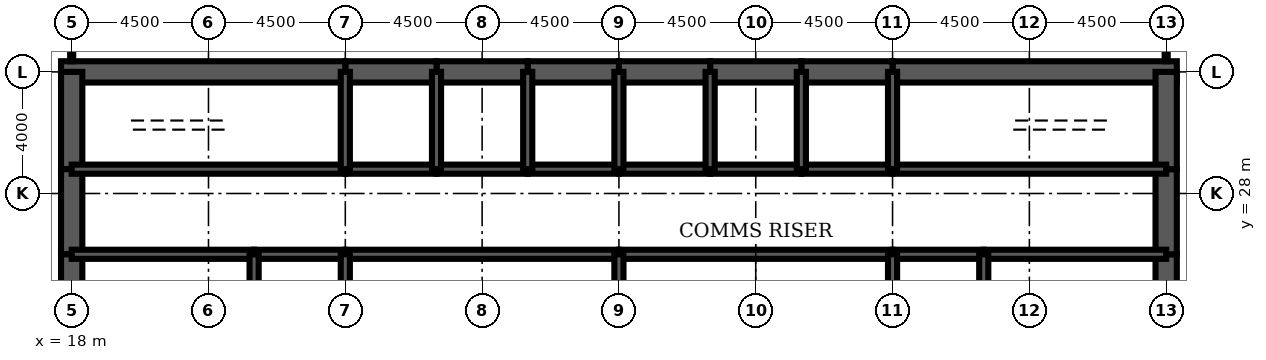
"""IFC4 building model, lengths in metres.
Left out: names, types, materials, properties, quantities, classifications, styles, units other than length and angle.
Written with IfcOpenShell. Run it as: python <this file> out.ifc"""

import sys

from ifc_helpers import new_model, si_unit, direction, frame, frame_2d, origin, place, context, subcontext, project, spatial, rectangle, extrude, element, fill, save


model = new_model("IFC4")
c1 = context("Model", 3, precision=1e-05, world=origin(), true_north=direction((0.0, 1.0)))
c2 = subcontext(c1, "Body", "Model", "MODEL_VIEW")
j1 = project(units=[si_unit("LENGTHUNIT", "METRE"), si_unit("PLANEANGLEUNIT", "RADIAN")], contexts=[c1])
p1 = place(None, origin())
s1 = spatial("IfcSite", under=j1, at=p1, CompositionType="ELEMENT")
p2 = place(p1, origin())
s2 = spatial("IfcBuilding", under=s1, at=p2, CompositionType="ELEMENT")
p3 = place(p2, frame((0.0, 0.0, 275.3)))
s3 = spatial("IfcBuildingStorey", under=s2, at=p3, CompositionType="ELEMENT", Elevation=275.3)
p4 = place(p3, frame((54.35, 32.0, 0.0), z_axis=(0.0, 0.0, 1.0), x_axis=(-1.0, 0.0, 0.0)))
e1 = element("IfcWall", 1, at=p4, inside=s3, PredefinedType="SHEAR", context=c2, shape_type="SweptSolid", body=[
    extrude(rectangle(XDim=9.35, YDim=0.7, at=frame_2d((4.675, 0.0))), origin(), (0.0, 0.0, 1.0), 4.2),
])
for number, where, z_axis, x_axis in (
    (2, (45.0, 32.0, 0.0), (0.0, 0.0, 1.0), (-1.0, 0.0, 0.0)),
    (3, (42.0, 32.0, 0.0), (0.0, 0.0, 1.0), (-1.0, 0.0, 0.0)),
    (4, (39.0, 32.0, 0.0), (0.0, 0.0, 1.0), (-1.0, 0.0, 0.0)),
    (5, (36.0, 32.0, 0.0), (0.0, 0.0, 1.0), (-1.0, 0.0, 0.0)),
    (6, (33.0, 32.0, 0.0), (0.0, 0.0, 1.0), (-1.0, 0.0, 0.0)),
    (7, (30.0, 32.0, 0.0), (0.0, 0.0, 1.0), (-1.0, 0.0, 0.0)),
):
    element("IfcWall", number, at=place(p3, frame(where, z_axis=z_axis, x_axis=x_axis)), inside=s3, PredefinedType="SHEAR", context=c2, shape_type="SweptSolid", body=[
        extrude(rectangle(XDim=3.0, YDim=0.7, at=frame_2d((1.5, 0.0))), origin(), (0.0, 0.0, 1.0), 4.2),
    ])
p5 = place(p3, frame((27.0, 32.0, 0.0), z_axis=(0.0, 0.0, 1.0), x_axis=(-1.0, 0.0, 0.0)))
e8 = element("IfcWall", 8, at=p5, inside=s3, PredefinedType="SHEAR", context=c2, shape_type="SweptSolid", body=[
    extrude(rectangle(XDim=9.35, YDim=0.7, at=frame_2d((4.675, 0.0))), origin(), (0.0, 0.0, 1.0), 4.2),
])
p6 = place(p3, frame((18.0, 32.0, 0.0), z_axis=(0.0, 0.0, 1.0), x_axis=(0.0, -1.0, 0.0)))
e9 = element("IfcWall", 9, at=p6, inside=s3, PredefinedType="SHEAR", context=c2, shape_type="SweptSolid", body=[
    extrude(rectangle(XDim=3.2, YDim=0.7, at=frame_2d((1.6, 0.0))), origin(), (0.0, 0.0, 1.0), 4.2),
])
p7 = place(p3, frame((18.0, 28.8, 0.0), z_axis=(0.0, 0.0, 1.0), x_axis=(0.0, -1.0, 0.0)))
e10 = element("IfcWall", 10, at=p7, inside=s3, PredefinedType="SHEAR", context=c2, shape_type="SweptSolid", body=[
    extrude(rectangle(XDim=2.8, YDim=0.7, at=frame_2d((1.4, 0.0))), origin(), (0.0, 0.0, 1.0), 4.2),
])
p8 = place(p7, frame((0.4, 0.0, 0.0)))
e11 = element("IfcOpeningElement", 11, at=p8, cuts=e10, PredefinedType="OPENING", context=c2, shape_type="SweptSolid", body=[
    extrude(rectangle(XDim=1.8, YDim=2.1, at=frame_2d((0.9, 1.05))), frame((0.0, 0.36, 0.0), z_axis=(0.0, -1.0, 0.0), x_axis=(1.0, 0.0, 0.0)), (0.0, 0.0, 1.0), 0.72),
])
for number, where, z_axis, x_axis in (
    (12, (18.0, 26.0, 0.0), (0.0, 0.0, 1.0), (0.0, -1.0, 0.0)),
    (13, (54.0, 22.0, 0.0), (0.0, 0.0, 1.0), (0.0, 1.0, 0.0)),
):
    element("IfcWall", number, at=place(p3, frame(where, z_axis=z_axis, x_axis=x_axis)), inside=s3, PredefinedType="SHEAR", context=c2, shape_type="SweptSolid", body=[
        extrude(rectangle(XDim=4.0, YDim=0.7, at=frame_2d((2.0, 0.0))), origin(), (0.0, 0.0, 1.0), 4.2),
    ])
p9 = place(p3, frame((54.0, 26.0, 0.0), z_axis=(0.0, 0.0, 1.0), x_axis=(0.0, 1.0, 0.0)))
e14 = element("IfcWall", 14, at=p9, inside=s3, PredefinedType="SHEAR", context=c2, shape_type="SweptSolid", body=[
    extrude(rectangle(XDim=2.8, YDim=0.7, at=frame_2d((1.4, 0.0))), origin(), (0.0, 0.0, 1.0), 4.2),
])
p10 = place(p9, frame((0.6, 0.0, 0.0)))
e15 = element("IfcOpeningElement", 15, at=p10, cuts=e14, PredefinedType="OPENING", context=c2, shape_type="SweptSolid", body=[
    extrude(rectangle(XDim=1.8, YDim=2.1, at=frame_2d((0.9, 1.05))), frame((0.0, 0.36, 0.0), z_axis=(0.0, -1.0, 0.0), x_axis=(1.0, 0.0, 0.0)), (0.0, 0.0, 1.0), 0.72),
])
p11 = place(p3, frame((54.0, 28.8, 0.0), z_axis=(0.0, 0.0, 1.0), x_axis=(0.0, 1.0, 0.0)))
e16 = element("IfcWall", 16, at=p11, inside=s3, PredefinedType="SHEAR", context=c2, shape_type="SweptSolid", body=[
    extrude(rectangle(XDim=3.2, YDim=0.7, at=frame_2d((1.6, 0.0))), origin(), (0.0, 0.0, 1.0), 4.2),
])
p12 = place(p3, frame((18.0, 28.8, 0.0), z_axis=(0.0, 0.0, 1.0), x_axis=(1.0, 0.0, 0.0)))
e17 = element("IfcWall", 17, at=p12, inside=s3, PredefinedType="SOLIDWALL", context=c2, shape_type="SweptSolid", body=[
    extrude(rectangle(XDim=9.0, YDim=0.3, at=frame_2d((4.5, 0.0))), origin(), (0.0, 0.0, 1.0), 4.2),
])
p13 = place(p12, frame((0.65, 0.0, 0.0)))
e18 = element("IfcOpeningElement", 18, at=p13, cuts=e17, PredefinedType="OPENING", context=c2, shape_type="SweptSolid", body=[
    extrude(rectangle(XDim=1.0, YDim=2.1, at=frame_2d((0.5, 1.05))), frame((0.0, 0.16, 0.0), z_axis=(0.0, -1.0, 0.0), x_axis=(1.0, 0.0, 0.0)), (0.0, 0.0, 1.0), 0.32),
])
p14 = place(p3, frame((27.0, 28.8, 0.0), z_axis=(0.0, 0.0, 1.0), x_axis=(1.0, 0.0, 0.0)))
e19 = element("IfcWall", 19, at=p14, inside=s3, PredefinedType="SOLIDWALL", context=c2, shape_type="SweptSolid", body=[
    extrude(rectangle(XDim=3.0, YDim=0.3, at=frame_2d((1.5, 0.0))), origin(), (0.0, 0.0, 1.0), 4.2),
])
p15 = place(p14, frame((0.95, 0.0, 0.0)))
e20 = element("IfcOpeningElement", 20, at=p15, cuts=e19, PredefinedType="OPENING", context=c2, shape_type="SweptSolid", body=[
    extrude(rectangle(XDim=1.1, YDim=2.2, at=frame_2d((0.55, 1.1))), frame((0.0, 0.16, 0.0), z_axis=(0.0, -1.0, 0.0), x_axis=(1.0, 0.0, 0.0)), (0.0, 0.0, 1.0), 0.32),
])
p16 = place(p3, frame((30.0, 28.8, 0.0), z_axis=(0.0, 0.0, 1.0), x_axis=(1.0, 0.0, 0.0)))
e21 = element("IfcWall", 21, at=p16, inside=s3, PredefinedType="SOLIDWALL", context=c2, shape_type="SweptSolid", body=[
    extrude(rectangle(XDim=3.0, YDim=0.3, at=frame_2d((1.5, 0.0))), origin(), (0.0, 0.0, 1.0), 4.2),
])
p17 = place(p16, frame((0.95, 0.0, 0.0)))
e22 = element("IfcOpeningElement", 22, at=p17, cuts=e21, PredefinedType="OPENING", context=c2, shape_type="SweptSolid", body=[
    extrude(rectangle(XDim=1.1, YDim=2.2, at=frame_2d((0.55, 1.1))), frame((0.0, 0.16, 0.0), z_axis=(0.0, -1.0, 0.0), x_axis=(1.0, 0.0, 0.0)), (0.0, 0.0, 1.0), 0.32),
])
p18 = place(p3, frame((33.0, 28.8, 0.0), z_axis=(0.0, 0.0, 1.0), x_axis=(1.0, 0.0, 0.0)))
e23 = element("IfcWall", 23, at=p18, inside=s3, PredefinedType="SOLIDWALL", context=c2, shape_type="SweptSolid", body=[
    extrude(rectangle(XDim=3.0, YDim=0.3, at=frame_2d((1.5, 0.0))), origin(), (0.0, 0.0, 1.0), 4.2),
])
p19 = place(p18, frame((0.95, 0.0, 0.0)))
e24 = element("IfcOpeningElement", 24, at=p19, cuts=e23, PredefinedType="OPENING", context=c2, shape_type="SweptSolid", body=[
    extrude(rectangle(XDim=1.1, YDim=2.2, at=frame_2d((0.55, 1.1))), frame((0.0, 0.16, 0.0), z_axis=(0.0, -1.0, 0.0), x_axis=(1.0, 0.0, 0.0)), (0.0, 0.0, 1.0), 0.32),
])
p20 = place(p3, frame((36.0, 28.8, 0.0), z_axis=(0.0, 0.0, 1.0), x_axis=(1.0, 0.0, 0.0)))
e25 = element("IfcWall", 25, at=p20, inside=s3, PredefinedType="SOLIDWALL", context=c2, shape_type="SweptSolid", body=[
    extrude(rectangle(XDim=3.0, YDim=0.3, at=frame_2d((1.5, 0.0))), origin(), (0.0, 0.0, 1.0), 4.2),
])
p21 = place(p20, frame((1.0, 0.0, 0.0)))
e26 = element("IfcOpeningElement", 26, at=p21, cuts=e25, PredefinedType="OPENING", context=c2, shape_type="SweptSolid", body=[
    extrude(rectangle(XDim=1.0, YDim=2.1, at=frame_2d((0.5, 1.05))), frame((0.0, 0.16, 0.0), z_axis=(0.0, -1.0, 0.0), x_axis=(1.0, 0.0, 0.0)), (0.0, 0.0, 1.0), 0.32),
])
p22 = place(p3, frame((39.0, 28.8, 0.0), z_axis=(0.0, 0.0, 1.0), x_axis=(1.0, 0.0, 0.0)))
e27 = element("IfcWall", 27, at=p22, inside=s3, PredefinedType="SOLIDWALL", context=c2, shape_type="SweptSolid", body=[
    extrude(rectangle(XDim=3.0, YDim=0.3, at=frame_2d((1.5, 0.0))), origin(), (0.0, 0.0, 1.0), 4.2),
])
p23 = place(p22, frame((1.0, 0.0, 0.0)))
e28 = element("IfcOpeningElement", 28, at=p23, cuts=e27, PredefinedType="OPENING", context=c2, shape_type="SweptSolid", body=[
    extrude(rectangle(XDim=1.0, YDim=2.1, at=frame_2d((0.5, 1.05))), frame((0.0, 0.16, 0.0), z_axis=(0.0, -1.0, 0.0), x_axis=(1.0, 0.0, 0.0)), (0.0, 0.0, 1.0), 0.32),
])
p24 = place(p3, frame((42.0, 28.8, 0.0), z_axis=(0.0, 0.0, 1.0), x_axis=(1.0, 0.0, 0.0)))
e29 = element("IfcWall", 29, at=p24, inside=s3, PredefinedType="SOLIDWALL", context=c2, shape_type="SweptSolid", body=[
    extrude(rectangle(XDim=3.0, YDim=0.3, at=frame_2d((1.5, 0.0))), origin(), (0.0, 0.0, 1.0), 4.2),
])
p25 = place(p24, frame((0.95, 0.0, 0.0)))
e30 = element("IfcOpeningElement", 30, at=p25, cuts=e29, PredefinedType="OPENING", context=c2, shape_type="SweptSolid", body=[
    extrude(rectangle(XDim=1.1, YDim=2.2, at=frame_2d((0.55, 1.1))), frame((0.0, 0.16, 0.0), z_axis=(0.0, -1.0, 0.0), x_axis=(1.0, 0.0, 0.0)), (0.0, 0.0, 1.0), 0.32),
])
p26 = place(p3, frame((45.0, 28.8, 0.0), z_axis=(0.0, 0.0, 1.0), x_axis=(1.0, 0.0, 0.0)))
e31 = element("IfcWall", 31, at=p26, inside=s3, PredefinedType="SOLIDWALL", context=c2, shape_type="SweptSolid", body=[
    extrude(rectangle(XDim=9.0, YDim=0.3, at=frame_2d((4.5, 0.0))), origin(), (0.0, 0.0, 1.0), 4.2),
])
p27 = place(p26, frame((7.35, 0.0, 0.0)))
e32 = element("IfcOpeningElement", 32, at=p27, cuts=e31, PredefinedType="OPENING", context=c2, shape_type="SweptSolid", body=[
    extrude(rectangle(XDim=1.0, YDim=2.1, at=frame_2d((0.5, 1.05))), frame((0.0, 0.16, 0.0), z_axis=(0.0, -1.0, 0.0), x_axis=(1.0, 0.0, 0.0)), (0.0, 0.0, 1.0), 0.32),
])
p28 = place(p3, frame((18.0, 26.0, 0.0), z_axis=(0.0, 0.0, 1.0), x_axis=(1.0, 0.0, 0.0)))
e33 = element("IfcWall", 33, at=p28, inside=s3, PredefinedType="SOLIDWALL", context=c2, shape_type="SweptSolid", body=[
    extrude(rectangle(XDim=6.0, YDim=0.3, at=frame_2d((3.0, 0.0))), origin(), (0.0, 0.0, 1.0), 4.2),
])
p29 = place(p3, frame((24.0, 26.0, 0.0), z_axis=(0.0, 0.0, 1.0), x_axis=(1.0, 0.0, 0.0)))
e34 = element("IfcWall", 34, at=p29, inside=s3, PredefinedType="SOLIDWALL", context=c2, shape_type="SweptSolid", body=[
    extrude(rectangle(XDim=3.0, YDim=0.3, at=frame_2d((1.5, 0.0))), origin(), (0.0, 0.0, 1.0), 4.2),
])
for number, where, z_axis, x_axis in (
    (35, (27.0, 26.0, 0.0), (0.0, 0.0, 1.0), (1.0, 0.0, 0.0)),
    (36, (36.0, 26.0, 0.0), (0.0, 0.0, 1.0), (1.0, 0.0, 0.0)),
):
    element("IfcWall", number, at=place(p3, frame(where, z_axis=z_axis, x_axis=x_axis)), inside=s3, PredefinedType="SOLIDWALL", context=c2, shape_type="SweptSolid", body=[
        extrude(rectangle(XDim=9.0, YDim=0.3, at=frame_2d((4.5, 0.0))), origin(), (0.0, 0.0, 1.0), 4.2),
    ])
p30 = place(p3, frame((45.0, 26.0, 0.0), z_axis=(0.0, 0.0, 1.0), x_axis=(1.0, 0.0, 0.0)))
e37 = element("IfcWall", 37, at=p30, inside=s3, PredefinedType="SOLIDWALL", context=c2, shape_type="SweptSolid", body=[
    extrude(rectangle(XDim=3.0, YDim=0.3, at=frame_2d((1.5, 0.0))), origin(), (0.0, 0.0, 1.0), 4.2),
])
p31 = place(p3, frame((48.0, 26.0, 0.0), z_axis=(0.0, 0.0, 1.0), x_axis=(1.0, 0.0, 0.0)))
e38 = element("IfcWall", 38, at=p31, inside=s3, PredefinedType="SOLIDWALL", context=c2, shape_type="SweptSolid", body=[
    extrude(rectangle(XDim=6.0, YDim=0.3, at=frame_2d((3.0, 0.0))), origin(), (0.0, 0.0, 1.0), 4.2),
])
for number, where, z_axis, x_axis in (
    (39, (27.0, 28.8, 0.0), (0.0, 0.0, 1.0), (0.0, 1.0, 0.0)),
    (40, (30.0, 28.8, 0.0), (0.0, 0.0, 1.0), (0.0, 1.0, 0.0)),
    (41, (33.0, 28.8, 0.0), (0.0, 0.0, 1.0), (0.0, 1.0, 0.0)),
    (42, (36.0, 28.8, 0.0), (0.0, 0.0, 1.0), (0.0, 1.0, 0.0)),
    (43, (39.0, 28.8, 0.0), (0.0, 0.0, 1.0), (0.0, 1.0, 0.0)),
    (44, (42.0, 28.8, 0.0), (0.0, 0.0, 1.0), (0.0, 1.0, 0.0)),
    (45, (45.0, 28.8, 0.0), (0.0, 0.0, 1.0), (0.0, 1.0, 0.0)),
):
    element("IfcWall", number, at=place(p3, frame(where, z_axis=z_axis, x_axis=x_axis)), inside=s3, PredefinedType="SOLIDWALL", context=c2, shape_type="SweptSolid", body=[
        extrude(rectangle(XDim=3.2, YDim=0.3, at=frame_2d((1.6, 0.0))), origin(), (0.0, 0.0, 1.0), 4.2),
    ])
for number, where, z_axis, x_axis in (
    (46, (24.0, 22.0, 0.0), (0.0, 0.0, 1.0), (0.0, 1.0, 0.0)),
    (47, (27.0, 22.0, 0.0), (0.0, 0.0, 1.0), (0.0, 1.0, 0.0)),
    (48, (36.0, 22.0, 0.0), (0.0, 0.0, 1.0), (0.0, 1.0, 0.0)),
    (49, (45.0, 22.0, 0.0), (0.0, 0.0, 1.0), (0.0, 1.0, 0.0)),
    (50, (48.0, 22.0, 0.0), (0.0, 0.0, 1.0), (0.0, 1.0, 0.0)),
):
    element("IfcWall", number, at=place(p3, frame(where, z_axis=z_axis, x_axis=x_axis)), inside=s3, PredefinedType="SOLIDWALL", context=c2, shape_type="SweptSolid", body=[
        extrude(rectangle(XDim=4.0, YDim=0.3, at=frame_2d((2.0, 0.0))), origin(), (0.0, 0.0, 1.0), 4.2),
    ])
p32 = place(p3, frame((42.0, 22.15, 0.0), z_axis=(0.0, 0.0, 1.0), x_axis=(0.0, 1.0, 0.0)))
e51 = element("IfcWall", 51, at=p32, inside=s3, PredefinedType="PARTITIONING", context=c2, shape_type="SweptSolid", body=[
    extrude(rectangle(XDim=3.7, YDim=0.15, at=frame_2d((1.85, 0.0))), origin(), (0.0, 0.0, 1.0), 3.0),
])
p33 = place(p32, frame((2.2, 0.0, 0.0)))
e52 = element("IfcOpeningElement", 52, at=p33, cuts=e51, PredefinedType="OPENING", context=c2, shape_type="SweptSolid", body=[
    extrude(rectangle(XDim=1.0, YDim=2.1, at=frame_2d((0.5, 1.05))), frame((0.0, 0.085, 0.0), z_axis=(0.0, -1.0, 0.0), x_axis=(1.0, 0.0, 0.0)), (0.0, 0.0, 1.0), 0.17),
])
for number, where, z_axis, x_axis in (
    (53, (20.525, 22.15, 0.0), (0.0, 0.0, 1.0), (0.0, 1.0, 0.0)),
    (54, (51.475, 22.15, 0.0), (0.0, 0.0, 1.0), (0.0, 1.0, 0.0)),
):
    element("IfcWall", number, at=place(p3, frame(where, z_axis=z_axis, x_axis=x_axis)), inside=s3, PredefinedType="PARTITIONING", context=c2, shape_type="SweptSolid", body=[
        extrude(rectangle(XDim=3.7, YDim=0.15, at=frame_2d((1.85, 0.0))), origin(), (0.0, 0.0, 1.0), 3.0),
    ])
p34 = place(p3, frame((18.0, 32.35, 0.0), z_axis=(0.0, 0.0, 1.0), x_axis=(0.0, 1.0, 0.0)))
e55 = element("IfcWall", 55, at=p34, inside=s3, PredefinedType="PARTITIONING", context=c2, shape_type="SweptSolid", body=[
    extrude(rectangle(XDim=5.7, YDim=0.1, at=frame_2d((2.85, 0.0))), origin(), (0.0, 0.0, 1.0), 3.0),
])
p35 = place(p34, frame((2.05, 0.0, 0.0)))
e56 = element("IfcOpeningElement", 56, at=p35, cuts=e55, PredefinedType="OPENING", context=c2, shape_type="SweptSolid", body=[
    extrude(rectangle(XDim=1.6, YDim=2.1, at=frame_2d((0.8, 1.05))), frame((0.0, 0.06, 0.0), z_axis=(0.0, -1.0, 0.0), x_axis=(1.0, 0.0, 0.0)), (0.0, 0.0, 1.0), 0.12),
])
p36 = place(p3, frame((54.0, 32.35, 0.0), z_axis=(0.0, 0.0, 1.0), x_axis=(0.0, 1.0, 0.0)))
e57 = element("IfcWall", 57, at=p36, inside=s3, PredefinedType="PARTITIONING", context=c2, shape_type="SweptSolid", body=[
    extrude(rectangle(XDim=5.7, YDim=0.1, at=frame_2d((2.85, 0.0))), origin(), (0.0, 0.0, 1.0), 3.0),
])
p37 = place(p36, frame((2.05, 0.0, 0.0)))
e58 = element("IfcOpeningElement", 58, at=p37, cuts=e57, PredefinedType="OPENING", context=c2, shape_type="SweptSolid", body=[
    extrude(rectangle(XDim=1.6, YDim=2.1, at=frame_2d((0.8, 1.05))), frame((0.0, 0.06, 0.0), z_axis=(0.0, -1.0, 0.0), x_axis=(1.0, 0.0, 0.0)), (0.0, 0.0, 1.0), 0.12),
])
p38 = place(p33, origin())
e59 = element("IfcDoor", 59, at=p38, inside=s3, OperationType="SINGLE_SWING_RIGHT", PredefinedType="DOOR", context=c2, shape_type="SweptSolid", body=[
    extrude(rectangle(XDim=1.0, YDim=2.1, at=frame_2d((0.5, 1.05))), frame((0.0, 0.025, 0.0), z_axis=(0.0, -1.0, 0.0), x_axis=(1.0, 0.0, 0.0)), (0.0, 0.0, 1.0), 0.05),
])
fill(e52, e59)
p39 = place(p25, origin())
e60 = element("IfcDoor", 60, at=p39, inside=s3, OperationType="DOUBLE_DOOR_SLIDING", PredefinedType="USERDEFINED", context=c2, shape_type="SweptSolid", body=[
    extrude(rectangle(XDim=1.1, YDim=2.2, at=frame_2d((0.55, 1.1))), frame((0.0, 0.025, 0.0), z_axis=(0.0, -1.0, 0.0), x_axis=(1.0, 0.0, 0.0)), (0.0, 0.0, 1.0), 0.05),
])
fill(e30, e60)
p40 = place(p15, origin())
e61 = element("IfcDoor", 61, at=p40, inside=s3, OperationType="DOUBLE_DOOR_SLIDING", PredefinedType="USERDEFINED", context=c2, shape_type="SweptSolid", body=[
    extrude(rectangle(XDim=1.1, YDim=2.2, at=frame_2d((0.55, 1.1))), frame((0.0, 0.025, 0.0), z_axis=(0.0, -1.0, 0.0), x_axis=(1.0, 0.0, 0.0)), (0.0, 0.0, 1.0), 0.05),
])
fill(e20, e61)
p41 = place(p17, origin())
e62 = element("IfcDoor", 62, at=p41, inside=s3, OperationType="DOUBLE_DOOR_SLIDING", PredefinedType="USERDEFINED", context=c2, shape_type="SweptSolid", body=[
    extrude(rectangle(XDim=1.1, YDim=2.2, at=frame_2d((0.55, 1.1))), frame((0.0, 0.025, 0.0), z_axis=(0.0, -1.0, 0.0), x_axis=(1.0, 0.0, 0.0)), (0.0, 0.0, 1.0), 0.05),
])
fill(e22, e62)
p42 = place(p19, origin())
e63 = element("IfcDoor", 63, at=p42, inside=s3, OperationType="DOUBLE_DOOR_SLIDING", PredefinedType="USERDEFINED", context=c2, shape_type="SweptSolid", body=[
    extrude(rectangle(XDim=1.1, YDim=2.2, at=frame_2d((0.55, 1.1))), frame((0.0, 0.025, 0.0), z_axis=(0.0, -1.0, 0.0), x_axis=(1.0, 0.0, 0.0)), (0.0, 0.0, 1.0), 0.05),
])
fill(e24, e63)
p43 = place(p13, origin())
e64 = element("IfcDoor", 64, at=p43, inside=s3, OperationType="SINGLE_SWING_LEFT", PredefinedType="DOOR", context=c2, shape_type="SweptSolid", body=[
    extrude(rectangle(XDim=1.0, YDim=2.1, at=frame_2d((0.5, 1.05))), frame((0.0, 0.025, 0.0), z_axis=(0.0, -1.0, 0.0), x_axis=(1.0, 0.0, 0.0)), (0.0, 0.0, 1.0), 0.05),
])
fill(e18, e64)
p44 = place(p27, origin())
e65 = element("IfcDoor", 65, at=p44, inside=s3, OperationType="SINGLE_SWING_RIGHT", PredefinedType="DOOR", context=c2, shape_type="SweptSolid", body=[
    extrude(rectangle(XDim=1.0, YDim=2.1, at=frame_2d((0.5, 1.05))), frame((0.0, 0.025, 0.0), z_axis=(0.0, -1.0, 0.0), x_axis=(1.0, 0.0, 0.0)), (0.0, 0.0, 1.0), 0.05),
])
fill(e32, e65)
p45 = place(p8, origin())
e66 = element("IfcDoor", 66, at=p45, inside=s3, OperationType="SINGLE_SWING_LEFT", PredefinedType="DOOR", context=c2, shape_type="SweptSolid", body=[
    extrude(rectangle(XDim=1.8, YDim=2.1, at=frame_2d((0.9, 1.05))), frame((0.0, 0.35, 0.0), z_axis=(0.0, -1.0, 0.0), x_axis=(1.0, 0.0, 0.0)), (0.0, 0.0, 1.0), 0.699),
])
fill(e11, e66)
p46 = place(p10, origin())
e67 = element("IfcDoor", 67, at=p46, inside=s3, OperationType="SINGLE_SWING_LEFT", PredefinedType="DOOR", context=c2, shape_type="SweptSolid", body=[
    extrude(rectangle(XDim=1.8, YDim=2.1, at=frame_2d((0.9, 1.05))), frame((0.0, 0.35, 0.0), z_axis=(0.0, -1.0, 0.0), x_axis=(1.0, 0.0, 0.0)), (0.0, 0.0, 1.0), 0.699),
])
fill(e15, e67)
p47 = place(p21, origin())
e68 = element("IfcDoor", 68, at=p47, inside=s3, OperationType="SINGLE_SWING_LEFT", PredefinedType="DOOR", context=c2, shape_type="SweptSolid", body=[
    extrude(rectangle(XDim=1.0, YDim=2.1, at=frame_2d((0.5, 1.05))), frame((0.0, 0.025, 0.0), z_axis=(0.0, -1.0, 0.0), x_axis=(1.0, 0.0, 0.0)), (0.0, 0.0, 1.0), 0.05),
])
fill(e26, e68)
p48 = place(p23, origin())
e69 = element("IfcDoor", 69, at=p48, inside=s3, OperationType="SINGLE_SWING_LEFT", PredefinedType="DOOR", context=c2, shape_type="SweptSolid", body=[
    extrude(rectangle(XDim=1.0, YDim=2.1, at=frame_2d((0.5, 1.05))), frame((0.0, 0.025, 0.0), z_axis=(0.0, -1.0, 0.0), x_axis=(1.0, 0.0, 0.0)), (0.0, 0.0, 1.0), 0.05),
])
fill(e28, e69)
save(model, sys.argv[1])
